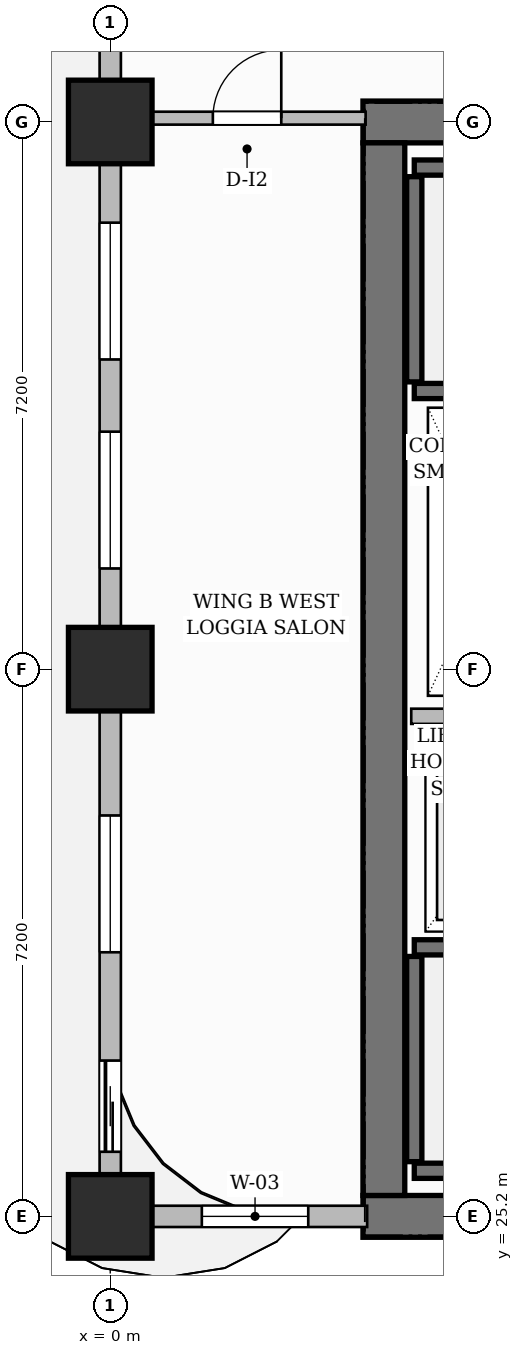
"""IFC4 building model, lengths in metres.
Left out: names, types, materials, properties, quantities, classifications, styles, units other than length and angle.
Written with IfcOpenShell. Run it as: python <this file> out.ifc"""

import sys

from ifc_helpers import new_model, si_unit, direction, frame, frame_2d, origin, origin_2d, place, context, subcontext, project, spatial, rectangle, extrude, source, transform, mapped, element, fill, save


model = new_model("IFC4")
c1 = context("Model", 3, precision=1e-05, world=origin(), true_north=direction((0.0, 1.0)))
c2 = subcontext(c1, "Body", "Model", "MODEL_VIEW")
j1 = project(units=[si_unit("LENGTHUNIT", "METRE"), si_unit("PLANEANGLEUNIT", "RADIAN")], contexts=[c1])
p1 = place(None, origin())
s1 = spatial("IfcSite", under=j1, at=p1, CompositionType="ELEMENT")
p2 = place(p1, origin())
s2 = spatial("IfcBuilding", under=s1, at=p2, CompositionType="ELEMENT")
p3 = place(p2, frame((0.0, 0.0, 102.7)))
s3 = spatial("IfcBuildingStorey", under=s2, at=p3, CompositionType="ELEMENT", Elevation=102.7)
for number, where, z_axis, x_axis in (
    (1, (3.325, 25.2, 0.0), (0.0, 0.0, 1.0), (1.0, 0.0, 0.0)),
    (2, (3.325, 39.6, 0.0), (0.0, 0.0, 1.0), (1.0, 0.0, 0.0)),
):
    element("IfcWall", number, at=place(p3, frame(where, z_axis=z_axis, x_axis=x_axis)), inside=s3, PredefinedType="SHEAR", context=c2, shape_type="SweptSolid", body=[
        extrude(rectangle(XDim=8.35, YDim=0.55, at=frame_2d((4.175, 0.0))), origin(), (0.0, 0.0, 1.0), 3.7),
    ])
p4 = place(p3, frame((3.6, 25.475, 0.0), z_axis=(0.0, 0.0, 1.0), x_axis=(0.0, 1.0, 0.0)))
e3 = element("IfcWall", 3, at=p4, inside=s3, PredefinedType="SHEAR", context=c2, shape_type="SweptSolid", body=[
    extrude(rectangle(XDim=13.85, YDim=0.55, at=frame_2d((6.925, 0.0))), origin(), (0.0, 0.0, 1.0), 3.7),
])
m1 = source(origin(), c2, "Body", "SweptSolid", [
    extrude(rectangle(XDim=1.1, YDim=1.1, at=origin_2d()), origin(), (0.0, 0.0, 1.0), 3.7),
])
for number, where, z_axis, x_axis in (
    (4, (0.0, 25.2, 0.0), (0.0, 0.0, 1.0), (1.0, 0.0, 0.0)),
    (5, (0.0, 32.4, 0.0), (0.0, 0.0, 1.0), (1.0, 0.0, 0.0)),
    (6, (0.0, 39.6, 0.0), (0.0, 0.0, 1.0), (1.0, 0.0, 0.0)),
):
    element("IfcColumn", number, at=place(p3, frame(where, z_axis=z_axis, x_axis=x_axis)), inside=s3, PredefinedType="COLUMN", context=c2, shape_type="MappedRepresentation", body=[
        mapped(m1, transform((0.0, 0.0, 0.0), scale=1.0)),
    ])
p5 = place(p3, frame((4.0, 25.8, 0.0), z_axis=(0.0, 0.0, 1.0), x_axis=(1.0, 0.0, 0.0)))
e7 = element("IfcWall", 7, at=p5, inside=s3, PredefinedType="SHEAR", context=c2, shape_type="SweptSolid", body=[
    extrude(rectangle(XDim=7.1, YDim=0.2, at=frame_2d((3.55, 0.0))), origin(), (0.0, 0.0, 1.0), 3.7),
])
p6 = place(p3, frame((4.0, 25.92, 0.0), z_axis=(0.0, 0.0, 1.0), x_axis=(0.0, 1.0, 0.0)))
e8 = element("IfcWall", 8, at=p6, inside=s3, PredefinedType="SHEAR", context=c2, shape_type="SweptSolid", body=[
    extrude(rectangle(XDim=2.7, YDim=0.2, at=frame_2d((1.35, 0.0))), origin(), (0.0, 0.0, 1.0), 3.7),
])
p7 = place(p3, frame((4.0, 28.74, 0.0), z_axis=(0.0, 0.0, 1.0), x_axis=(1.0, 0.0, 0.0)))
e9 = element("IfcWall", 9, at=p7, inside=s3, PredefinedType="SHEAR", context=c2, shape_type="SweptSolid", body=[
    extrude(rectangle(XDim=7.1, YDim=0.2, at=frame_2d((3.55, 0.0))), origin(), (0.0, 0.0, 1.0), 3.7),
])
p8 = place(p7, frame((5.815, 0.0, 0.0)))
e10 = element("IfcOpeningElement", 10, at=p8, cuts=e9, PredefinedType="OPENING", context=c2, shape_type="SweptSolid", body=[
    extrude(rectangle(XDim=1.05, YDim=2.2, at=frame_2d((0.525, 1.1))), frame((0.0, 0.11, 0.0), z_axis=(0.0, -1.0, 0.0), x_axis=(1.0, 0.0, 0.0)), (0.0, 0.0, 1.0), 0.22),
])
p9 = place(p3, frame((4.0, 39.0, 0.0), z_axis=(0.0, 0.0, 1.0), x_axis=(1.0, 0.0, 0.0)))
e11 = element("IfcWall", 11, at=p9, inside=s3, PredefinedType="SHEAR", context=c2, shape_type="SweptSolid", body=[
    extrude(rectangle(XDim=7.1, YDim=0.2, at=frame_2d((3.55, 0.0))), origin(), (0.0, 0.0, 1.0), 3.7),
])
p10 = place(p3, frame((4.0, 36.18, 0.0), z_axis=(0.0, 0.0, 1.0), x_axis=(0.0, 1.0, 0.0)))
e12 = element("IfcWall", 12, at=p10, inside=s3, PredefinedType="SHEAR", context=c2, shape_type="SweptSolid", body=[
    extrude(rectangle(XDim=2.7, YDim=0.2, at=frame_2d((1.35, 0.0))), origin(), (0.0, 0.0, 1.0), 3.7),
])
p11 = place(p3, frame((4.0, 36.06, 0.0), z_axis=(0.0, 0.0, 1.0), x_axis=(1.0, 0.0, 0.0)))
e13 = element("IfcWall", 13, at=p11, inside=s3, PredefinedType="SHEAR", context=c2, shape_type="SweptSolid", body=[
    extrude(rectangle(XDim=7.1, YDim=0.2, at=frame_2d((3.55, 0.0))), origin(), (0.0, 0.0, 1.0), 3.7),
])
p12 = place(p11, frame((5.815, 0.0, 0.0)))
e14 = element("IfcOpeningElement", 14, at=p12, cuts=e13, PredefinedType="OPENING", context=c2, shape_type="SweptSolid", body=[
    extrude(rectangle(XDim=1.05, YDim=2.2, at=frame_2d((0.525, 1.1))), frame((0.0, 0.11, 0.0), z_axis=(0.0, -1.0, 0.0), x_axis=(1.0, 0.0, 0.0)), (0.0, 0.0, 1.0), 0.22),
])
p13 = place(p3, frame((3.96, 31.78, 0.0), z_axis=(0.0, 0.0, 1.0), x_axis=(1.0, 0.0, 0.0)))
e15 = element("IfcWall", 15, at=p13, inside=s3, PredefinedType="PARTITIONING", context=c2, shape_type="SweptSolid", body=[
    extrude(rectangle(XDim=2.13, YDim=0.2, at=frame_2d((1.065, 0.0))), origin(), (0.0, 0.0, 1.0), 3.4),
])
p14 = place(p3, frame((0.24, 39.65, 0.0), z_axis=(0.0, 0.0, 1.0), x_axis=(1.0, 0.0, 0.0)))
e16 = element("IfcWall", 16, at=p14, inside=s3, PredefinedType="PARTITIONING", context=c2, shape_type="SweptSolid", body=[
    extrude(rectangle(XDim=3.12, YDim=0.17, at=frame_2d((1.56, 0.0))), origin(), (0.0, 0.0, 1.0), 3.4),
])
p15 = place(p14, frame((1.11, 0.0, 0.0)))
e17 = element("IfcOpeningElement", 17, at=p15, cuts=e16, PredefinedType="OPENING", context=c2, shape_type="SweptSolid", body=[
    extrude(rectangle(XDim=0.9, YDim=2.15, at=frame_2d((0.45, 1.075))), frame((0.0, 0.095, 0.0), z_axis=(0.0, -1.0, 0.0), x_axis=(1.0, 0.0, 0.0)), (0.0, 0.0, 1.0), 0.19),
])
p16 = place(p3, frame((0.0, 25.2, 0.0), z_axis=(0.0, 0.0, 1.0), x_axis=(1.0, 0.0, 0.0)))
e18 = element("IfcWall", 18, at=p16, inside=s3, PredefinedType="SOLIDWALL", context=c2, shape_type="SweptSolid", body=[
    extrude(rectangle(XDim=3.38, YDim=0.28, at=frame_2d((1.69, 0.0))), origin(), (0.0, 0.0, 1.0), 3.4),
])
p17 = place(p16, frame((1.205, 0.0, 0.8)))
e19 = element("IfcOpeningElement", 19, at=p17, cuts=e18, PredefinedType="OPENING", context=c2, shape_type="SweptSolid", body=[
    extrude(rectangle(XDim=1.4, YDim=1.85, at=frame_2d((0.7, 0.925))), frame((0.0, 0.15, 0.0), z_axis=(0.0, -1.0, 0.0), x_axis=(1.0, 0.0, 0.0)), (0.0, 0.0, 1.0), 0.3),
])
p18 = place(p3, frame((0.0, 25.25, 0.0), z_axis=(0.0, 0.0, 1.0), x_axis=(0.0, 1.0, 0.0)))
e20 = element("IfcWall", 20, at=p18, inside=s3, PredefinedType="SOLIDWALL", context=c2, shape_type="SweptSolid", body=[
    extrude(rectangle(XDim=21.5, YDim=0.28, at=frame_2d((10.75, 0.0))), origin(), (0.0, 0.0, 1.0), 2.835),
])
p19 = place(p18, frame((18.45, 0.0, 0.0)))
e21 = element("IfcOpeningElement", 21, at=p19, cuts=e20, PredefinedType="OPENING", context=c2, shape_type="SweptSolid", body=[
    extrude(rectangle(XDim=1.2, YDim=2.2, at=frame_2d((0.6, 1.1))), frame((0.0, 0.15, 0.0), z_axis=(0.0, -1.0, 0.0), x_axis=(1.0, 0.0, 0.0)), (0.0, 0.0, 1.0), 0.3),
])
p20 = place(p18, frame((0.8, 0.0, 0.0)))
e22 = element("IfcOpeningElement", 22, at=p20, cuts=e20, PredefinedType="OPENING", context=c2, shape_type="SweptSolid", body=[
    extrude(rectangle(XDim=1.2, YDim=2.2, at=frame_2d((0.6, 1.1))), frame((0.0, 0.15, 0.0), z_axis=(0.0, -1.0, 0.0), x_axis=(1.0, 0.0, 0.0)), (0.0, 0.0, 1.0), 0.3),
])
p21 = place(p18, frame((3.425, 0.0, 0.8)))
e23 = element("IfcOpeningElement", 23, at=p21, cuts=e20, PredefinedType="OPENING", context=c2, shape_type="SweptSolid", body=[
    extrude(rectangle(XDim=1.8, YDim=1.85, at=frame_2d((0.9, 0.925))), frame((0.0, 0.15, 0.0), z_axis=(0.0, -1.0, 0.0), x_axis=(1.0, 0.0, 0.0)), (0.0, 0.0, 1.0), 0.3),
])
p22 = place(p18, frame((8.475, 0.0, 0.8)))
e24 = element("IfcOpeningElement", 24, at=p22, cuts=e20, PredefinedType="OPENING", context=c2, shape_type="SweptSolid", body=[
    extrude(rectangle(XDim=1.8, YDim=1.85, at=frame_2d((0.9, 0.925))), frame((0.0, 0.15, 0.0), z_axis=(0.0, -1.0, 0.0), x_axis=(1.0, 0.0, 0.0)), (0.0, 0.0, 1.0), 0.3),
])
p23 = place(p18, frame((11.225, 0.0, 0.8)))
e25 = element("IfcOpeningElement", 25, at=p23, cuts=e20, PredefinedType="OPENING", context=c2, shape_type="SweptSolid", body=[
    extrude(rectangle(XDim=1.8, YDim=1.85, at=frame_2d((0.9, 0.925))), frame((0.0, 0.15, 0.0), z_axis=(0.0, -1.0, 0.0), x_axis=(1.0, 0.0, 0.0)), (0.0, 0.0, 1.0), 0.3),
])
p24 = place(p18, frame((15.75, 0.0, 0.8)))
e26 = element("IfcOpeningElement", 26, at=p24, cuts=e20, PredefinedType="OPENING", context=c2, shape_type="SweptSolid", body=[
    extrude(rectangle(XDim=1.8, YDim=1.85, at=frame_2d((0.9, 0.925))), frame((0.0, 0.15, 0.0), z_axis=(0.0, -1.0, 0.0), x_axis=(1.0, 0.0, 0.0)), (0.0, 0.0, 1.0), 0.3),
])
m2 = source(origin(), c2, "Body", "SweptSolid", [
    extrude(rectangle(XDim=0.9, YDim=2.15, at=frame_2d((0.45, 1.075))), frame((0.0, 0.025, 0.0), z_axis=(0.0, -1.0, 0.0), x_axis=(1.0, 0.0, 0.0)), (0.0, 0.0, 1.0), 0.05),
])
p25 = place(p15, origin())
e27 = element("IfcDoor", 27, at=p25, inside=s3, OperationType="SINGLE_SWING_RIGHT", PredefinedType="DOOR", context=c2, shape_type="MappedRepresentation", body=[
    mapped(m2, transform((0.0, 0.0, 0.0), scale=1.0)),
])
fill(e17, e27)
m3 = source(origin(), c2, "Body", "SweptSolid", [
    extrude(rectangle(XDim=1.2, YDim=2.2, at=frame_2d((0.6, 1.1))), frame((0.0, 0.025, 0.0), z_axis=(0.0, -1.0, 0.0), x_axis=(1.0, 0.0, 0.0)), (0.0, 0.0, 1.0), 0.05),
])
p26 = place(p20, origin())
e28 = element("IfcDoor", 28, at=p26, inside=s3, OperationType="SLIDING_TO_LEFT", PredefinedType="DOOR", context=c2, shape_type="MappedRepresentation", body=[
    mapped(m3, transform((0.0, 0.0, 0.0), scale=1.0)),
])
fill(e22, e28)
m4 = source(origin(), c2, "Body", "SweptSolid", [
    extrude(rectangle(XDim=1.4, YDim=1.85, at=frame_2d((0.7, 0.925))), frame((0.0, 0.03, 0.0), z_axis=(0.0, -1.0, 0.0), x_axis=(1.0, 0.0, 0.0)), (0.0, 0.0, 1.0), 0.06),
])
p27 = place(p17, origin())
e29 = element("IfcWindow", 29, at=p27, inside=s3, PartitioningType="SINGLE_PANEL", PredefinedType="WINDOW", context=c2, shape_type="MappedRepresentation", body=[
    mapped(m4, transform((0.0, 0.0, 0.0), scale=1.0)),
])
fill(e19, e29)
m5 = source(origin(), c2, "Body", "SweptSolid", [
    extrude(rectangle(XDim=1.8, YDim=1.85, at=frame_2d((0.9, 0.925))), frame((0.0, 0.03, 0.0), z_axis=(0.0, -1.0, 0.0), x_axis=(1.0, 0.0, 0.0)), (0.0, 0.0, 1.0), 0.06),
])
p28 = place(p21, origin())
e30 = element("IfcWindow", 30, at=p28, inside=s3, PartitioningType="DOUBLE_PANEL_VERTICAL", PredefinedType="WINDOW", context=c2, shape_type="MappedRepresentation", body=[
    mapped(m5, transform((0.0, 0.0, 0.0), scale=1.0)),
])
fill(e23, e30)
p29 = place(p22, origin())
e31 = element("IfcWindow", 31, at=p29, inside=s3, PartitioningType="DOUBLE_PANEL_VERTICAL", PredefinedType="WINDOW", context=c2, shape_type="MappedRepresentation", body=[
    mapped(m5, transform((0.0, 0.0, 0.0), scale=1.0)),
])
fill(e24, e31)
p30 = place(p23, origin())
e32 = element("IfcWindow", 32, at=p30, inside=s3, PartitioningType="DOUBLE_PANEL_VERTICAL", PredefinedType="WINDOW", context=c2, shape_type="MappedRepresentation", body=[
    mapped(m5, transform((0.0, 0.0, 0.0), scale=1.0)),
])
fill(e25, e32)
save(model, sys.argv[1])
